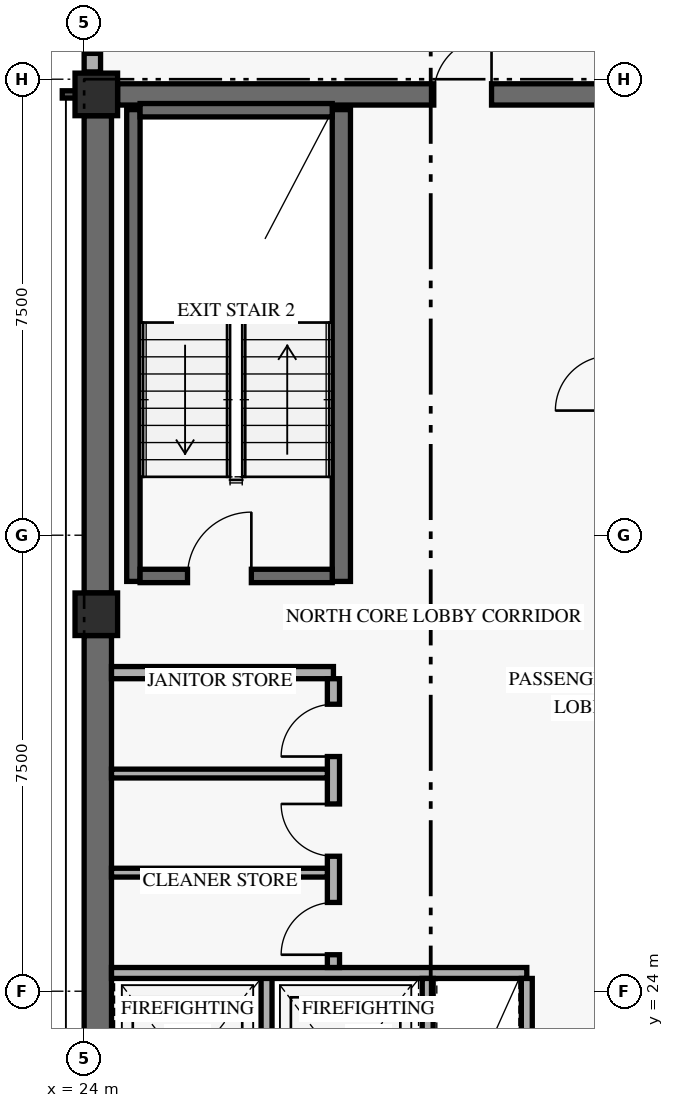
"""IFC4 building model, lengths in metres.
Left out: names, types, materials, properties, quantities, classifications, styles, units other than length and angle.
Written with IfcOpenShell. Run it as: python <this file> out.ifc"""

import sys

from ifc_helpers import new_model, si_unit, direction, frame, frame_2d, origin, origin_2d, place, context, subcontext, project, spatial, rectangle, extrude, element, fill, save


model = new_model("IFC4")
c1 = context("Model", 3, precision=1e-05, world=origin(), true_north=direction((0.0, 1.0)))
c2 = subcontext(c1, "Body", "Model", "MODEL_VIEW")
j1 = project(units=[si_unit("LENGTHUNIT", "METRE"), si_unit("PLANEANGLEUNIT", "RADIAN")], contexts=[c1])
p1 = place(None, origin())
s1 = spatial("IfcSite", under=j1, at=p1, CompositionType="ELEMENT")
p2 = place(p1, origin())
s2 = spatial("IfcBuilding", under=s1, at=p2, CompositionType="ELEMENT")
p3 = place(p2, frame((0.0, 0.0, 223.8)))
s3 = spatial("IfcBuildingStorey", under=s2, at=p3, CompositionType="ELEMENT", Elevation=223.8)
p4 = place(p3, frame((24.225, 17.9, 0.0), z_axis=(0.0, 0.0, 1.0), x_axis=(0.0, 1.0, 0.0)))
e1 = element("IfcWall", 1, at=p4, inside=s3, PredefinedType="SHEAR", context=c2, shape_type="SweptSolid", body=[
    extrude(rectangle(XDim=11.95, YDim=0.45, at=frame_2d((5.975, 0.0))), origin(), (0.0, 0.0, 1.0), 2.821),
])
p5 = place(p3, frame((24.225, 30.55, 0.0), z_axis=(0.0, 0.0, 1.0), x_axis=(0.0, 1.0, 0.0)))
e2 = element("IfcWall", 2, at=p5, inside=s3, PredefinedType="SHEAR", context=c2, shape_type="SweptSolid", body=[
    extrude(rectangle(XDim=7.85, YDim=0.45, at=frame_2d((3.925, 0.0))), origin(), (0.0, 0.0, 1.0), 2.821),
])
p6 = place(p3, frame((24.55, 38.75, 0.0), z_axis=(0.0, 0.0, 1.0), x_axis=(1.0, 0.0, 0.0)))
e3 = element("IfcWall", 3, at=p6, inside=s3, PredefinedType="SHEAR", context=c2, shape_type="SweptSolid", body=[
    extrude(rectangle(XDim=10.3, YDim=0.35, at=frame_2d((5.15, 0.0))), origin(), (0.0, 0.0, 1.0), 3.36),
])
p7 = place(p6, frame((5.2, 0.0, 0.0)))
e4 = element("IfcOpeningElement", 4, at=p7, cuts=e3, PredefinedType="OPENING", context=c2, shape_type="SweptSolid", body=[
    extrude(rectangle(XDim=0.95, YDim=2.15, at=frame_2d((0.475, 1.075))), frame((0.0, 0.185, 0.0), z_axis=(0.0, -1.0, 0.0), x_axis=(1.0, 0.0, 0.0)), (0.0, 0.0, 1.0), 0.37),
])
p8 = place(p3, frame((24.81, 30.74, 0.0), z_axis=(0.0, 0.0, 1.0), x_axis=(0.0, 1.0, 0.0)))
e5 = element("IfcWall", 5, at=p8, inside=s3, PredefinedType="SHEAR", context=c2, shape_type="SweptSolid", body=[
    extrude(rectangle(XDim=7.76, YDim=0.22, at=frame_2d((3.88, 0.0))), origin(), (0.0, 0.0, 1.0), 3.36),
])
p9 = place(p3, frame((28.23, 30.74, 0.0), z_axis=(0.0, 0.0, 1.0), x_axis=(0.0, 1.0, 0.0)))
e6 = element("IfcWall", 6, at=p9, inside=s3, PredefinedType="SHEAR", context=c2, shape_type="SweptSolid", body=[
    extrude(rectangle(XDim=7.76, YDim=0.3, at=frame_2d((3.88, 0.0))), origin(), (0.0, 0.0, 1.0), 3.36),
])
p10 = place(p3, frame((24.92, 30.83, 0.0), z_axis=(0.0, 0.0, 1.0), x_axis=(1.0, 0.0, 0.0)))
e7 = element("IfcWall", 7, at=p10, inside=s3, PredefinedType="SHEAR", context=c2, shape_type="SweptSolid", body=[
    extrude(rectangle(XDim=3.16, YDim=0.22, at=frame_2d((1.58, 0.0))), origin(), (0.0, 0.0, 1.0), 3.36),
])
p11 = place(p10, frame((0.78, 0.0, 0.0)))
e8 = element("IfcOpeningElement", 8, at=p11, cuts=e7, PredefinedType="OPENING", context=c2, shape_type="SweptSolid", body=[
    extrude(rectangle(XDim=1.05, YDim=2.15, at=frame_2d((0.525, 1.075))), frame((0.0, 0.12, 0.0), z_axis=(0.0, -1.0, 0.0), x_axis=(1.0, 0.0, 0.0)), (0.0, 0.0, 1.0), 0.24),
])
p12 = place(p3, frame((24.92, 38.49, 0.0), z_axis=(0.0, 0.0, 1.0), x_axis=(1.0, 0.0, 0.0)))
e9 = element("IfcWall", 9, at=p12, inside=s3, PredefinedType="SHEAR", context=c2, shape_type="SweptSolid", body=[
    extrude(rectangle(XDim=3.16, YDim=0.22, at=frame_2d((1.58, 0.0))), origin(), (0.0, 0.0, 1.0), 3.36),
])
for number, where, z_axis, x_axis in (
    (10, (24.2, 30.2, 0.0), (0.0, 0.0, 1.0), (1.0, 0.0, 0.0)),
    (11, (24.2, 38.75, 0.0), (0.0, 0.0, 1.0), (1.0, 0.0, 0.0)),
):
    element("IfcColumn", number, at=place(p3, frame(where, z_axis=z_axis, x_axis=x_axis)), inside=s3, PredefinedType="COLUMN", context=c2, shape_type="SweptSolid", body=[
        extrude(rectangle(XDim=0.7, YDim=0.7, at=origin_2d()), origin(), (0.0, 0.0, 1.0), 3.6),
    ])
p13 = place(p3, frame((24.135, 39.12, 0.0), z_axis=(0.0, 0.0, 1.0), x_axis=(0.0, 1.0, 0.0)))
e12 = element("IfcWall", 12, at=p13, inside=s3, PredefinedType="SOLIDWALL", context=c2, shape_type="SweptSolid", body=[
    extrude(rectangle(XDim=1.56, YDim=0.27, at=frame_2d((0.78, 0.0))), origin(), (0.0, 0.0, 1.0), 2.803),
])
p14 = place(p13, frame((0.305, 0.0, 0.85)))
e13 = element("IfcOpeningElement", 13, at=p14, cuts=e12, PredefinedType="OPENING", context=c2, shape_type="SweptSolid", body=[
    extrude(rectangle(XDim=0.95, YDim=1.5, at=frame_2d((0.475, 0.75))), frame((0.0, 0.145, 0.0), z_axis=(0.0, -1.0, 0.0), x_axis=(1.0, 0.0, 0.0)), (0.0, 0.0, 1.0), 0.29),
])
p15 = place(p3, frame((27.0, 21.19, 0.0), z_axis=(0.0, 0.0, 1.0), x_axis=(0.0, 1.0, 0.0)))
e14 = element("IfcWall", 14, at=p15, inside=s3, PredefinedType="STANDARD", context=c2, shape_type="SweptSolid", body=[
    extrude(rectangle(XDim=3.11, YDim=0.18, at=frame_2d((1.555, 0.0))), origin(), (0.0, 0.0, 1.0), 3.36),
])
p16 = place(p3, frame((24.45, 24.3, 0.0), z_axis=(0.0, 0.0, 1.0), x_axis=(1.0, 0.0, 0.0)))
e15 = element("IfcWall", 15, at=p16, inside=s3, PredefinedType="STANDARD", context=c2, shape_type="SweptSolid", body=[
    extrude(rectangle(XDim=6.83, YDim=0.18, at=frame_2d((3.415, 0.0))), origin(), (0.0, 0.0, 1.0), 3.36),
])
for number, where, z_axis, x_axis in (
    (16, (29.65, 21.19, 0.0), (0.0, 0.0, 1.0), (0.0, 1.0, 0.0)),
    (17, (31.28, 21.19, 0.0), (0.0, 0.0, 1.0), (0.0, 1.0, 0.0)),
):
    element("IfcWall", number, at=place(p3, frame(where, z_axis=z_axis, x_axis=x_axis)), inside=s3, PredefinedType="STANDARD", context=c2, shape_type="SweptSolid", body=[
        extrude(rectangle(XDim=3.02, YDim=0.18, at=frame_2d((1.51, 0.0))), origin(), (0.0, 0.0, 1.0), 3.36),
    ])
p17 = place(p3, frame((24.45, 29.24, 0.0), z_axis=(0.0, 0.0, 1.0), x_axis=(1.0, 0.0, 0.0)))
e18 = element("IfcWall", 18, at=p17, inside=s3, PredefinedType="STANDARD", context=c2, shape_type="SweptSolid", body=[
    extrude(rectangle(XDim=3.65, YDim=0.2, at=frame_2d((1.825, 0.0))), origin(), (0.0, 0.0, 1.0), 3.36),
])
p18 = place(p3, frame((28.1, 24.39, 0.0), z_axis=(0.0, 0.0, 1.0), x_axis=(0.0, 1.0, 0.0)))
e19 = element("IfcWall", 19, at=p18, inside=s3, PredefinedType="STANDARD", context=c2, shape_type="SweptSolid", body=[
    extrude(rectangle(XDim=4.75, YDim=0.2, at=frame_2d((2.375, 0.0))), origin(), (0.0, 0.0, 1.0), 3.36),
])
p19 = place(p18, frame((0.21, 0.0, 0.0)))
e20 = element("IfcOpeningElement", 20, at=p19, cuts=e19, PredefinedType="OPENING", context=c2, shape_type="SweptSolid", body=[
    extrude(rectangle(XDim=0.86, YDim=2.1, at=frame_2d((0.43, 1.05))), frame((0.0, 0.11, 0.0), z_axis=(0.0, -1.0, 0.0), x_axis=(1.0, 0.0, 0.0)), (0.0, 0.0, 1.0), 0.22),
])
p20 = place(p18, frame((1.83, 0.0, 0.0)))
e21 = element("IfcOpeningElement", 21, at=p20, cuts=e19, PredefinedType="OPENING", context=c2, shape_type="SweptSolid", body=[
    extrude(rectangle(XDim=0.86, YDim=2.1, at=frame_2d((0.43, 1.05))), frame((0.0, 0.11, 0.0), z_axis=(0.0, -1.0, 0.0), x_axis=(1.0, 0.0, 0.0)), (0.0, 0.0, 1.0), 0.22),
])
p21 = place(p18, frame((3.47, 0.0, 0.0)))
e22 = element("IfcOpeningElement", 22, at=p21, cuts=e19, PredefinedType="OPENING", context=c2, shape_type="SweptSolid", body=[
    extrude(rectangle(XDim=0.86, YDim=2.1, at=frame_2d((0.43, 1.05))), frame((0.0, 0.11, 0.0), z_axis=(0.0, -1.0, 0.0), x_axis=(1.0, 0.0, 0.0)), (0.0, 0.0, 1.0), 0.22),
])
for number, where, z_axis, x_axis in (
    (23, (24.45, 25.95, 0.0), (0.0, 0.0, 1.0), (1.0, 0.0, 0.0)),
    (24, (24.45, 27.58, 0.0), (0.0, 0.0, 1.0), (1.0, 0.0, 0.0)),
):
    element("IfcWall", number, at=place(p3, frame(where, z_axis=z_axis, x_axis=x_axis)), inside=s3, PredefinedType="PARTITIONING", context=c2, shape_type="SweptSolid", body=[
        extrude(rectangle(XDim=3.55, YDim=0.145, at=frame_2d((1.775, 0.0))), origin(), (0.0, 0.0, 1.0), 3.36),
    ])
p22 = place(p14, origin())
e25 = element("IfcWindow", 25, at=p22, inside=s3, PartitioningType="SINGLE_PANEL", PredefinedType="WINDOW", context=c2, shape_type="SweptSolid", body=[
    extrude(rectangle(XDim=0.95, YDim=1.5, at=frame_2d((0.475, 0.75))), frame((0.0, 0.03, 0.0), z_axis=(0.0, -1.0, 0.0), x_axis=(1.0, 0.0, 0.0)), (0.0, 0.0, 1.0), 0.06),
])
fill(e13, e25)
p23 = place(p11, origin())
e26 = element("IfcDoor", 26, at=p23, inside=s3, OperationType="SINGLE_SWING_RIGHT", PredefinedType="DOOR", context=c2, shape_type="SweptSolid", body=[
    extrude(rectangle(XDim=1.05, YDim=2.15, at=frame_2d((0.525, 1.075))), frame((0.0, 0.025, 0.0), z_axis=(0.0, -1.0, 0.0), x_axis=(1.0, 0.0, 0.0)), (0.0, 0.0, 1.0), 0.05),
])
fill(e8, e26)
p24 = place(p19, origin())
e27 = element("IfcDoor", 27, at=p24, inside=s3, OperationType="SINGLE_SWING_LEFT", PredefinedType="DOOR", context=c2, shape_type="SweptSolid", body=[
    extrude(rectangle(XDim=0.86, YDim=2.1, at=frame_2d((0.43, 1.05))), frame((0.0, 0.025, 0.0), z_axis=(0.0, -1.0, 0.0), x_axis=(1.0, 0.0, 0.0)), (0.0, 0.0, 1.0), 0.05),
])
fill(e20, e27)
p25 = place(p20, origin())
e28 = element("IfcDoor", 28, at=p25, inside=s3, OperationType="SINGLE_SWING_RIGHT", PredefinedType="DOOR", context=c2, shape_type="SweptSolid", body=[
    extrude(rectangle(XDim=0.86, YDim=2.1, at=frame_2d((0.43, 1.05))), frame((0.0, 0.025, 0.0), z_axis=(0.0, -1.0, 0.0), x_axis=(1.0, 0.0, 0.0)), (0.0, 0.0, 1.0), 0.05),
])
fill(e21, e28)
p26 = place(p21, origin())
e29 = element("IfcDoor", 29, at=p26, inside=s3, OperationType="SINGLE_SWING_LEFT", PredefinedType="DOOR", context=c2, shape_type="SweptSolid", body=[
    extrude(rectangle(XDim=0.86, YDim=2.1, at=frame_2d((0.43, 1.05))), frame((0.0, 0.025, 0.0), z_axis=(0.0, -1.0, 0.0), x_axis=(1.0, 0.0, 0.0)), (0.0, 0.0, 1.0), 0.05),
])
fill(e22, e29)
p27 = place(p7, origin())
e30 = element("IfcDoor", 30, at=p27, inside=s3, OperationType="SINGLE_SWING_RIGHT", PredefinedType="DOOR", context=c2, shape_type="SweptSolid", body=[
    extrude(rectangle(XDim=0.95, YDim=2.15, at=frame_2d((0.475, 1.075))), frame((0.0, 0.025, 0.0), z_axis=(0.0, -1.0, 0.0), x_axis=(1.0, 0.0, 0.0)), (0.0, 0.0, 1.0), 0.05),
])
fill(e4, e30)
save(model, sys.argv[1])
